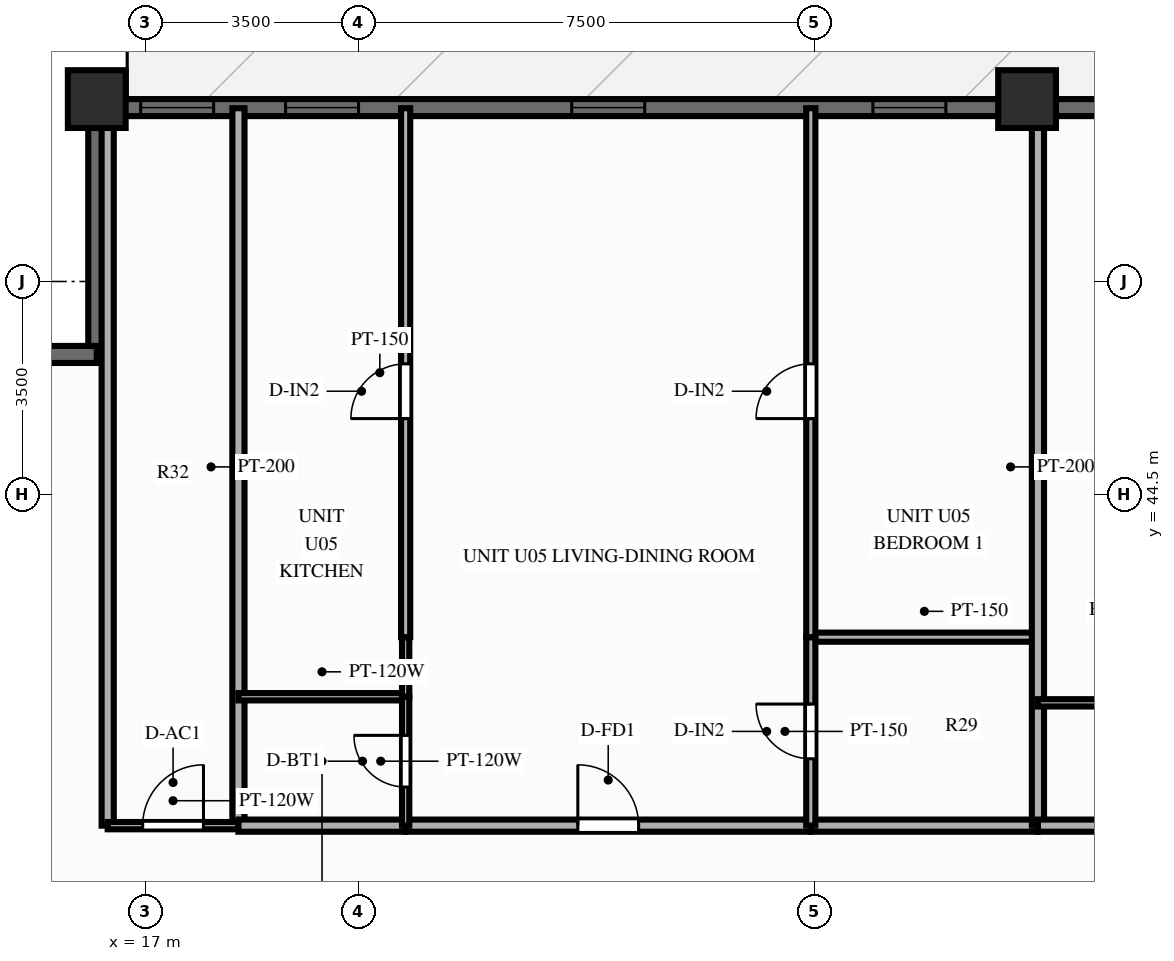
"""IFC4 building model, lengths in metres.
Left out: names, types, materials, properties, quantities, classifications, styles, units other than length and angle.
Written with IfcOpenShell. Run it as: python <this file> out.ifc"""

import sys

from ifc_helpers import new_model, si_unit, direction, frame, frame_2d, origin, origin_2d, place, context, subcontext, project, spatial, rectangle, extrude, source, transform, mapped, element, fill, save


model = new_model("IFC4")
c1 = context("Model", 3, precision=1e-05, world=origin(), true_north=direction((0.0, 1.0)))
c2 = subcontext(c1, "Body", "Model", "MODEL_VIEW")
j1 = project(units=[si_unit("LENGTHUNIT", "METRE"), si_unit("PLANEANGLEUNIT", "RADIAN")], contexts=[c1])
p1 = place(None, origin())
s1 = spatial("IfcSite", under=j1, at=p1, CompositionType="ELEMENT")
p2 = place(p1, origin())
s2 = spatial("IfcBuilding", under=s1, at=p2, CompositionType="ELEMENT")
p3 = place(p2, frame((0.0, 0.0, 83.85)))
s3 = spatial("IfcBuildingStorey", under=s2, at=p3, CompositionType="ELEMENT", Elevation=83.85)
m1 = source(origin(), c2, "Body", "SweptSolid", [
    extrude(rectangle(XDim=0.95, YDim=0.95, at=origin_2d()), origin(), (0.0, 0.0, 1.0), 3.0),
])
for number, where, z_axis, x_axis in (
    (1, (31.5, 51.0, 0.0), (0.0, 0.0, 1.0), (1.0, 0.0, 0.0)),
    (2, (16.2, 51.0, 0.0), (0.0, 0.0, 1.0), (1.0, 0.0, 0.0)),
):
    element("IfcColumn", number, at=place(p3, frame(where, z_axis=z_axis, x_axis=x_axis)), inside=s3, PredefinedType="COLUMN", context=c2, shape_type="MappedRepresentation", body=[
        mapped(m1, transform((0.0, 0.0, 0.0), scale=1.0)),
    ])
p4 = place(p3, frame((16.2, 50.86, 0.0), z_axis=(0.0, 0.0, 1.0), x_axis=(1.0, 0.0, 0.0)))
e3 = element("IfcWall", 3, at=p4, inside=s3, PredefinedType="SOLIDWALL", context=c2, shape_type="SweptSolid", body=[
    extrude(rectangle(XDim=43.6, YDim=0.28, at=frame_2d((21.8, 0.0))), origin(), (0.0, 0.0, 1.0), 2.28),
])
p5 = place(p4, frame((0.722, 0.0, 0.25)))
e4 = element("IfcOpeningElement", 4, at=p5, cuts=e3, PredefinedType="OPENING", context=c2, shape_type="SweptSolid", body=[
    extrude(rectangle(XDim=1.2, YDim=1.5, at=frame_2d((0.6, 0.75))), frame((0.0, 0.152, 0.0), z_axis=(0.0, -1.0, 0.0), x_axis=(1.0, 0.0, 0.0)), (0.0, 0.0, 1.0), 0.304),
])
p6 = place(p4, frame((3.105, 0.0, 0.25)))
e5 = element("IfcOpeningElement", 5, at=p6, cuts=e3, PredefinedType="OPENING", context=c2, shape_type="SweptSolid", body=[
    extrude(rectangle(XDim=1.2, YDim=1.5, at=frame_2d((0.6, 0.75))), frame((0.0, 0.152, 0.0), z_axis=(0.0, -1.0, 0.0), x_axis=(1.0, 0.0, 0.0)), (0.0, 0.0, 1.0), 0.304),
])
p7 = place(p4, frame((7.812, 0.0, 0.25)))
e6 = element("IfcOpeningElement", 6, at=p7, cuts=e3, PredefinedType="OPENING", context=c2, shape_type="SweptSolid", body=[
    extrude(rectangle(XDim=1.2, YDim=1.5, at=frame_2d((0.6, 0.75))), frame((0.0, 0.152, 0.0), z_axis=(0.0, -1.0, 0.0), x_axis=(1.0, 0.0, 0.0)), (0.0, 0.0, 1.0), 0.304),
])
p8 = place(p4, frame((12.764, 0.0, 0.25)))
e7 = element("IfcOpeningElement", 7, at=p8, cuts=e3, PredefinedType="OPENING", context=c2, shape_type="SweptSolid", body=[
    extrude(rectangle(XDim=1.2, YDim=1.5, at=frame_2d((0.6, 0.75))), frame((0.0, 0.152, 0.0), z_axis=(0.0, -1.0, 0.0), x_axis=(1.0, 0.0, 0.0)), (0.0, 0.0, 1.0), 0.304),
])
p9 = place(p4, frame((16.71, 0.0, 0.25)))
e8 = element("IfcOpeningElement", 8, at=p9, cuts=e3, PredefinedType="OPENING", context=c2, shape_type="SweptSolid", body=[
    extrude(rectangle(XDim=1.2, YDim=1.5, at=frame_2d((0.6, 0.75))), frame((0.0, 0.152, 0.0), z_axis=(0.0, -1.0, 0.0), x_axis=(1.0, 0.0, 0.0)), (0.0, 0.0, 1.0), 0.304),
])
p10 = place(p4, frame((21.604, 0.0, 0.0)))
e9 = element("IfcOpeningElement", 9, at=p10, cuts=e3, PredefinedType="OPENING", context=c2, shape_type="SweptSolid", body=[
    extrude(rectangle(XDim=1.1, YDim=2.15, at=frame_2d((0.55, 1.075))), frame((0.0, 0.152, 0.0), z_axis=(0.0, -1.0, 0.0), x_axis=(1.0, 0.0, 0.0)), (0.0, 0.0, 1.0), 0.304),
])
p11 = place(p4, frame((26.044, 0.0, 0.25)))
e10 = element("IfcOpeningElement", 10, at=p11, cuts=e3, PredefinedType="OPENING", context=c2, shape_type="SweptSolid", body=[
    extrude(rectangle(XDim=1.2, YDim=1.5, at=frame_2d((0.6, 0.75))), frame((0.0, 0.152, 0.0), z_axis=(0.0, -1.0, 0.0), x_axis=(1.0, 0.0, 0.0)), (0.0, 0.0, 1.0), 0.304),
])
p12 = place(p4, frame((30.306, 0.0, 0.25)))
e11 = element("IfcOpeningElement", 11, at=p12, cuts=e3, PredefinedType="OPENING", context=c2, shape_type="SweptSolid", body=[
    extrude(rectangle(XDim=1.2, YDim=1.5, at=frame_2d((0.6, 0.75))), frame((0.0, 0.152, 0.0), z_axis=(0.0, -1.0, 0.0), x_axis=(1.0, 0.0, 0.0)), (0.0, 0.0, 1.0), 0.304),
])
p13 = place(p4, frame((35.629, 0.0, 0.25)))
e12 = element("IfcOpeningElement", 12, at=p13, cuts=e3, PredefinedType="OPENING", context=c2, shape_type="SweptSolid", body=[
    extrude(rectangle(XDim=1.2, YDim=1.5, at=frame_2d((0.6, 0.75))), frame((0.0, 0.152, 0.0), z_axis=(0.0, -1.0, 0.0), x_axis=(1.0, 0.0, 0.0)), (0.0, 0.0, 1.0), 0.304),
])
p14 = place(p4, frame((40.885, 0.0, 0.25)))
e13 = element("IfcOpeningElement", 13, at=p14, cuts=e3, PredefinedType="OPENING", context=c2, shape_type="SweptSolid", body=[
    extrude(rectangle(XDim=1.2, YDim=1.5, at=frame_2d((0.6, 0.75))), frame((0.0, 0.152, 0.0), z_axis=(0.0, -1.0, 0.0), x_axis=(1.0, 0.0, 0.0)), (0.0, 0.0, 1.0), 0.304),
])
for number, where, z_axis, x_axis in (
    (14, (16.2, 46.8, 0.0), (0.0, 0.0, 1.0), (0.0, 1.0, 0.0)),
    (15, (12.08, 46.8, 0.0), (0.0, 0.0, 1.0), (1.0, 0.0, 0.0)),
):
    element("IfcWall", number, at=place(p3, frame(where, z_axis=z_axis, x_axis=x_axis)), inside=s3, PredefinedType="SOLIDWALL", context=c2, shape_type="SweptSolid", body=[
        extrude(rectangle(XDim=4.12, YDim=0.28, at=frame_2d((2.06, 0.0))), origin(), (0.0, 0.0, 1.0), 2.28),
    ])
for number, where, z_axis, x_axis in (
    (16, (16.38, 39.05, 0.0), (0.0, 0.0, 1.0), (0.0, 1.0, 0.0)),
    (17, (18.53, 39.05, 0.0), (0.0, 0.0, 1.0), (0.0, 1.0, 0.0)),
):
    element("IfcWall", number, at=place(p3, frame(where, z_axis=z_axis, x_axis=x_axis)), inside=s3, PredefinedType="PARTITIONING", context=c2, shape_type="SweptSolid", body=[
        extrude(rectangle(XDim=11.8, YDim=0.2, at=frame_2d((5.9, 0.0))), origin(), (0.0, 0.0, 1.0), 2.79),
    ])
p15 = place(p3, frame((16.38, 39.05, 0.0), z_axis=(0.0, 0.0, 1.0), x_axis=(1.0, 0.0, 0.0)))
e18 = element("IfcWall", 18, at=p15, inside=s3, PredefinedType="PARTITIONING", context=c2, shape_type="SweptSolid", body=[
    extrude(rectangle(XDim=2.15, YDim=0.12, at=frame_2d((1.075, 0.0))), origin(), (0.0, 0.0, 1.0), 2.79),
])
p16 = place(p15, frame((0.575, 0.0, 0.0)))
e19 = element("IfcOpeningElement", 19, at=p16, cuts=e18, PredefinedType="OPENING", context=c2, shape_type="SweptSolid", body=[
    extrude(rectangle(XDim=1.0, YDim=2.1, at=frame_2d((0.5, 1.05))), frame((0.0, 0.072, 0.0), z_axis=(0.0, -1.0, 0.0), x_axis=(1.0, 0.0, 0.0)), (0.0, 0.0, 1.0), 0.144),
])
p17 = place(p3, frame((18.53, 39.05, 0.0), z_axis=(0.0, 0.0, 1.0), x_axis=(1.0, 0.0, 0.0)))
e20 = element("IfcWall", 20, at=p17, inside=s3, PredefinedType="PARTITIONING", context=c2, shape_type="SweptSolid", body=[
    extrude(rectangle(XDim=2.75, YDim=0.2, at=frame_2d((1.375, 0.0))), origin(), (0.0, 0.0, 1.0), 2.79),
])
p18 = place(p3, frame((21.28, 39.05, 0.0), z_axis=(0.0, 0.0, 1.0), x_axis=(1.0, 0.0, 0.0)))
e21 = element("IfcWall", 21, at=p18, inside=s3, PredefinedType="PARTITIONING", context=c2, shape_type="SweptSolid", body=[
    extrude(rectangle(XDim=6.663, YDim=0.2, at=frame_2d((3.332, 0.0))), origin(), (0.0, 0.0, 1.0), 2.79),
])
p19 = place(p18, frame((2.832, 0.0, 0.0)))
e22 = element("IfcOpeningElement", 22, at=p19, cuts=e21, PredefinedType="OPENING", context=c2, shape_type="SweptSolid", body=[
    extrude(rectangle(XDim=1.0, YDim=2.15, at=frame_2d((0.5, 1.075))), frame((0.0, 0.112, 0.0), z_axis=(0.0, -1.0, 0.0), x_axis=(1.0, 0.0, 0.0)), (0.0, 0.0, 1.0), 0.224),
])
p20 = place(p3, frame((27.943, 39.05, 0.0), z_axis=(0.0, 0.0, 1.0), x_axis=(1.0, 0.0, 0.0)))
e23 = element("IfcWall", 23, at=p20, inside=s3, PredefinedType="PARTITIONING", context=c2, shape_type="SweptSolid", body=[
    extrude(rectangle(XDim=3.736, YDim=0.2, at=frame_2d((1.868, 0.0))), origin(), (0.0, 0.0, 1.0), 2.79),
])
p21 = place(p3, frame((18.53, 41.17, 0.0), z_axis=(0.0, 0.0, 1.0), x_axis=(1.0, 0.0, 0.0)))
e24 = element("IfcWall", 24, at=p21, inside=s3, PredefinedType="PARTITIONING", context=c2, shape_type="SweptSolid", body=[
    extrude(rectangle(XDim=2.75, YDim=0.12, at=frame_2d((1.375, 0.0))), origin(), (0.0, 0.0, 1.0), 2.79),
])
p22 = place(p3, frame((27.943, 42.15, 0.0), z_axis=(0.0, 0.0, 1.0), x_axis=(1.0, 0.0, 0.0)))
e25 = element("IfcWall", 25, at=p22, inside=s3, PredefinedType="PARTITIONING", context=c2, shape_type="SweptSolid", body=[
    extrude(rectangle(XDim=3.736, YDim=0.15, at=frame_2d((1.868, 0.0))), origin(), (0.0, 0.0, 1.0), 2.79),
])
p23 = place(p3, frame((21.28, 39.05, 0.0), z_axis=(0.0, 0.0, 1.0), x_axis=(0.0, 1.0, 0.0)))
e26 = element("IfcWall", 26, at=p23, inside=s3, PredefinedType="PARTITIONING", context=c2, shape_type="SweptSolid", body=[
    extrude(rectangle(XDim=2.12, YDim=0.12, at=frame_2d((1.06, 0.0))), origin(), (0.0, 0.0, 1.0), 2.79),
])
p24 = place(p23, frame((0.635, 0.0, 0.0)))
e27 = element("IfcOpeningElement", 27, at=p24, cuts=e26, PredefinedType="OPENING", context=c2, shape_type="SweptSolid", body=[
    extrude(rectangle(XDim=0.85, YDim=2.05, at=frame_2d((0.425, 1.025))), frame((0.0, 0.072, 0.0), z_axis=(0.0, -1.0, 0.0), x_axis=(1.0, 0.0, 0.0)), (0.0, 0.0, 1.0), 0.144),
])
p25 = place(p3, frame((21.28, 41.17, 0.0), z_axis=(0.0, 0.0, 1.0), x_axis=(0.0, 1.0, 0.0)))
e28 = element("IfcWall", 28, at=p25, inside=s3, PredefinedType="PARTITIONING", context=c2, shape_type="SweptSolid", body=[
    extrude(rectangle(XDim=0.98, YDim=0.12, at=frame_2d((0.49, 0.0))), origin(), (0.0, 0.0, 1.0), 2.79),
])
p26 = place(p3, frame((21.28, 42.15, 0.0), z_axis=(0.0, 0.0, 1.0), x_axis=(0.0, 1.0, 0.0)))
e29 = element("IfcWall", 29, at=p26, inside=s3, PredefinedType="PARTITIONING", context=c2, shape_type="SweptSolid", body=[
    extrude(rectangle(XDim=8.7, YDim=0.15, at=frame_2d((4.35, 0.0))), origin(), (0.0, 0.0, 1.0), 2.79),
])
p27 = place(p26, frame((3.595, 0.0, 0.0)))
e30 = element("IfcOpeningElement", 30, at=p27, cuts=e29, PredefinedType="OPENING", context=c2, shape_type="SweptSolid", body=[
    extrude(rectangle(XDim=0.9, YDim=2.1, at=frame_2d((0.45, 1.05))), frame((0.0, 0.087, 0.0), z_axis=(0.0, -1.0, 0.0), x_axis=(1.0, 0.0, 0.0)), (0.0, 0.0, 1.0), 0.174),
])
p28 = place(p3, frame((27.943, 39.05, 0.0), z_axis=(0.0, 0.0, 1.0), x_axis=(0.0, 1.0, 0.0)))
e31 = element("IfcWall", 31, at=p28, inside=s3, PredefinedType="PARTITIONING", context=c2, shape_type="SweptSolid", body=[
    extrude(rectangle(XDim=3.1, YDim=0.15, at=frame_2d((1.55, 0.0))), origin(), (0.0, 0.0, 1.0), 2.79),
])
p29 = place(p28, frame((1.1, 0.0, 0.0)))
e32 = element("IfcOpeningElement", 32, at=p29, cuts=e31, PredefinedType="OPENING", context=c2, shape_type="SweptSolid", body=[
    extrude(rectangle(XDim=0.9, YDim=2.1, at=frame_2d((0.45, 1.05))), frame((0.0, 0.087, 0.0), z_axis=(0.0, -1.0, 0.0), x_axis=(1.0, 0.0, 0.0)), (0.0, 0.0, 1.0), 0.174),
])
p30 = place(p3, frame((27.943, 42.15, 0.0), z_axis=(0.0, 0.0, 1.0), x_axis=(0.0, 1.0, 0.0)))
e33 = element("IfcWall", 33, at=p30, inside=s3, PredefinedType="PARTITIONING", context=c2, shape_type="SweptSolid", body=[
    extrude(rectangle(XDim=8.7, YDim=0.15, at=frame_2d((4.35, 0.0))), origin(), (0.0, 0.0, 1.0), 2.79),
])
p31 = place(p30, frame((3.595, 0.0, 0.0)))
e34 = element("IfcOpeningElement", 34, at=p31, cuts=e33, PredefinedType="OPENING", context=c2, shape_type="SweptSolid", body=[
    extrude(rectangle(XDim=0.9, YDim=2.1, at=frame_2d((0.45, 1.05))), frame((0.0, 0.087, 0.0), z_axis=(0.0, -1.0, 0.0), x_axis=(1.0, 0.0, 0.0)), (0.0, 0.0, 1.0), 0.174),
])
p32 = place(p3, frame((31.679, 39.05, 0.0), z_axis=(0.0, 0.0, 1.0), x_axis=(0.0, 1.0, 0.0)))
e35 = element("IfcWall", 35, at=p32, inside=s3, PredefinedType="PARTITIONING", context=c2, shape_type="SweptSolid", body=[
    extrude(rectangle(XDim=11.8, YDim=0.2, at=frame_2d((5.9, 0.0))), origin(), (0.0, 0.0, 1.0), 2.79),
])
p33 = place(p3, frame((31.679, 39.05, 0.0), z_axis=(0.0, 0.0, 1.0), x_axis=(1.0, 0.0, 0.0)))
e36 = element("IfcWall", 36, at=p33, inside=s3, PredefinedType="PARTITIONING", context=c2, shape_type="SweptSolid", body=[
    extrude(rectangle(XDim=3.526, YDim=0.2, at=frame_2d((1.763, 0.0))), origin(), (0.0, 0.0, 1.0), 2.79),
])
p34 = place(p3, frame((31.679, 41.07, 0.0), z_axis=(0.0, 0.0, 1.0), x_axis=(1.0, 0.0, 0.0)))
e37 = element("IfcWall", 37, at=p34, inside=s3, PredefinedType="PARTITIONING", context=c2, shape_type="SweptSolid", body=[
    extrude(rectangle(XDim=3.526, YDim=0.12, at=frame_2d((1.763, 0.0))), origin(), (0.0, 0.0, 1.0), 2.79),
])
m2 = source(origin(), c2, "Body", "SweptSolid", [
    extrude(rectangle(XDim=1.2, YDim=1.5, at=frame_2d((0.6, 0.75))), frame((0.0, 0.03, 0.0), z_axis=(0.0, -1.0, 0.0), x_axis=(1.0, 0.0, 0.0)), (0.0, 0.0, 1.0), 0.06),
])
p35 = place(p5, origin())
e38 = element("IfcWindow", 38, at=p35, inside=s3, PartitioningType="SINGLE_PANEL", PredefinedType="WINDOW", context=c2, shape_type="MappedRepresentation", body=[
    mapped(m2, transform((0.0, 0.0, 0.0), scale=1.0)),
])
fill(e4, e38)
p36 = place(p6, origin())
e39 = element("IfcWindow", 39, at=p36, inside=s3, PartitioningType="SINGLE_PANEL", PredefinedType="WINDOW", context=c2, shape_type="MappedRepresentation", body=[
    mapped(m2, transform((0.0, 0.0, 0.0), scale=1.0)),
])
fill(e5, e39)
p37 = place(p7, origin())
e40 = element("IfcWindow", 40, at=p37, inside=s3, PartitioningType="SINGLE_PANEL", PredefinedType="WINDOW", context=c2, shape_type="MappedRepresentation", body=[
    mapped(m2, transform((0.0, 0.0, 0.0), scale=1.0)),
])
fill(e6, e40)
p38 = place(p8, origin())
e41 = element("IfcWindow", 41, at=p38, inside=s3, PartitioningType="SINGLE_PANEL", PredefinedType="WINDOW", context=c2, shape_type="MappedRepresentation", body=[
    mapped(m2, transform((0.0, 0.0, 0.0), scale=1.0)),
])
fill(e7, e41)
m3 = source(origin(), c2, "Body", "SweptSolid", [
    extrude(rectangle(XDim=1.0, YDim=2.1, at=frame_2d((0.5, 1.05))), frame((0.0, 0.025, 0.0), z_axis=(0.0, -1.0, 0.0), x_axis=(1.0, 0.0, 0.0)), (0.0, 0.0, 1.0), 0.05),
])
p39 = place(p16, origin())
e42 = element("IfcDoor", 42, at=p39, inside=s3, OperationType="SINGLE_SWING_RIGHT", PredefinedType="DOOR", context=c2, shape_type="MappedRepresentation", body=[
    mapped(m3, transform((0.0, 0.0, 0.0), scale=1.0)),
])
fill(e19, e42)
m4 = source(origin(), c2, "Body", "SweptSolid", [
    extrude(rectangle(XDim=1.0, YDim=2.15, at=frame_2d((0.5, 1.075))), frame((0.0, 0.025, 0.0), z_axis=(0.0, -1.0, 0.0), x_axis=(1.0, 0.0, 0.0)), (0.0, 0.0, 1.0), 0.05),
])
p40 = place(p19, origin())
e43 = element("IfcDoor", 43, at=p40, inside=s3, OperationType="SINGLE_SWING_LEFT", PredefinedType="DOOR", context=c2, shape_type="MappedRepresentation", body=[
    mapped(m4, transform((0.0, 0.0, 0.0), scale=1.0)),
])
fill(e22, e43)
m5 = source(origin(), c2, "Body", "SweptSolid", [
    extrude(rectangle(XDim=0.85, YDim=2.05, at=frame_2d((0.425, 1.025))), frame((0.0, 0.025, 0.0), z_axis=(0.0, -1.0, 0.0), x_axis=(1.0, 0.0, 0.0)), (0.0, 0.0, 1.0), 0.05),
])
p41 = place(p24, origin())
e44 = element("IfcDoor", 44, at=p41, inside=s3, OperationType="SINGLE_SWING_RIGHT", PredefinedType="DOOR", context=c2, shape_type="MappedRepresentation", body=[
    mapped(m5, transform((0.0, 0.0, 0.0), scale=1.0)),
])
fill(e27, e44)
m6 = source(origin(), c2, "Body", "SweptSolid", [
    extrude(rectangle(XDim=0.9, YDim=2.1, at=frame_2d((0.45, 1.05))), frame((0.0, 0.025, 0.0), z_axis=(0.0, -1.0, 0.0), x_axis=(1.0, 0.0, 0.0)), (0.0, 0.0, 1.0), 0.05),
])
p42 = place(p27, origin())
e45 = element("IfcDoor", 45, at=p42, inside=s3, OperationType="SINGLE_SWING_LEFT", PredefinedType="DOOR", context=c2, shape_type="MappedRepresentation", body=[
    mapped(m6, transform((0.0, 0.0, 0.0), scale=1.0)),
])
fill(e30, e45)
p43 = place(p29, origin())
e46 = element("IfcDoor", 46, at=p43, inside=s3, OperationType="SINGLE_SWING_RIGHT", PredefinedType="DOOR", context=c2, shape_type="MappedRepresentation", body=[
    mapped(m6, transform((0.0, 0.0, 0.0), scale=1.0)),
])
fill(e32, e46)
p44 = place(p31, origin())
e47 = element("IfcDoor", 47, at=p44, inside=s3, OperationType="SINGLE_SWING_LEFT", PredefinedType="DOOR", context=c2, shape_type="MappedRepresentation", body=[
    mapped(m6, transform((0.0, 0.0, 0.0), scale=1.0)),
])
fill(e34, e47)
save(model, sys.argv[1])
